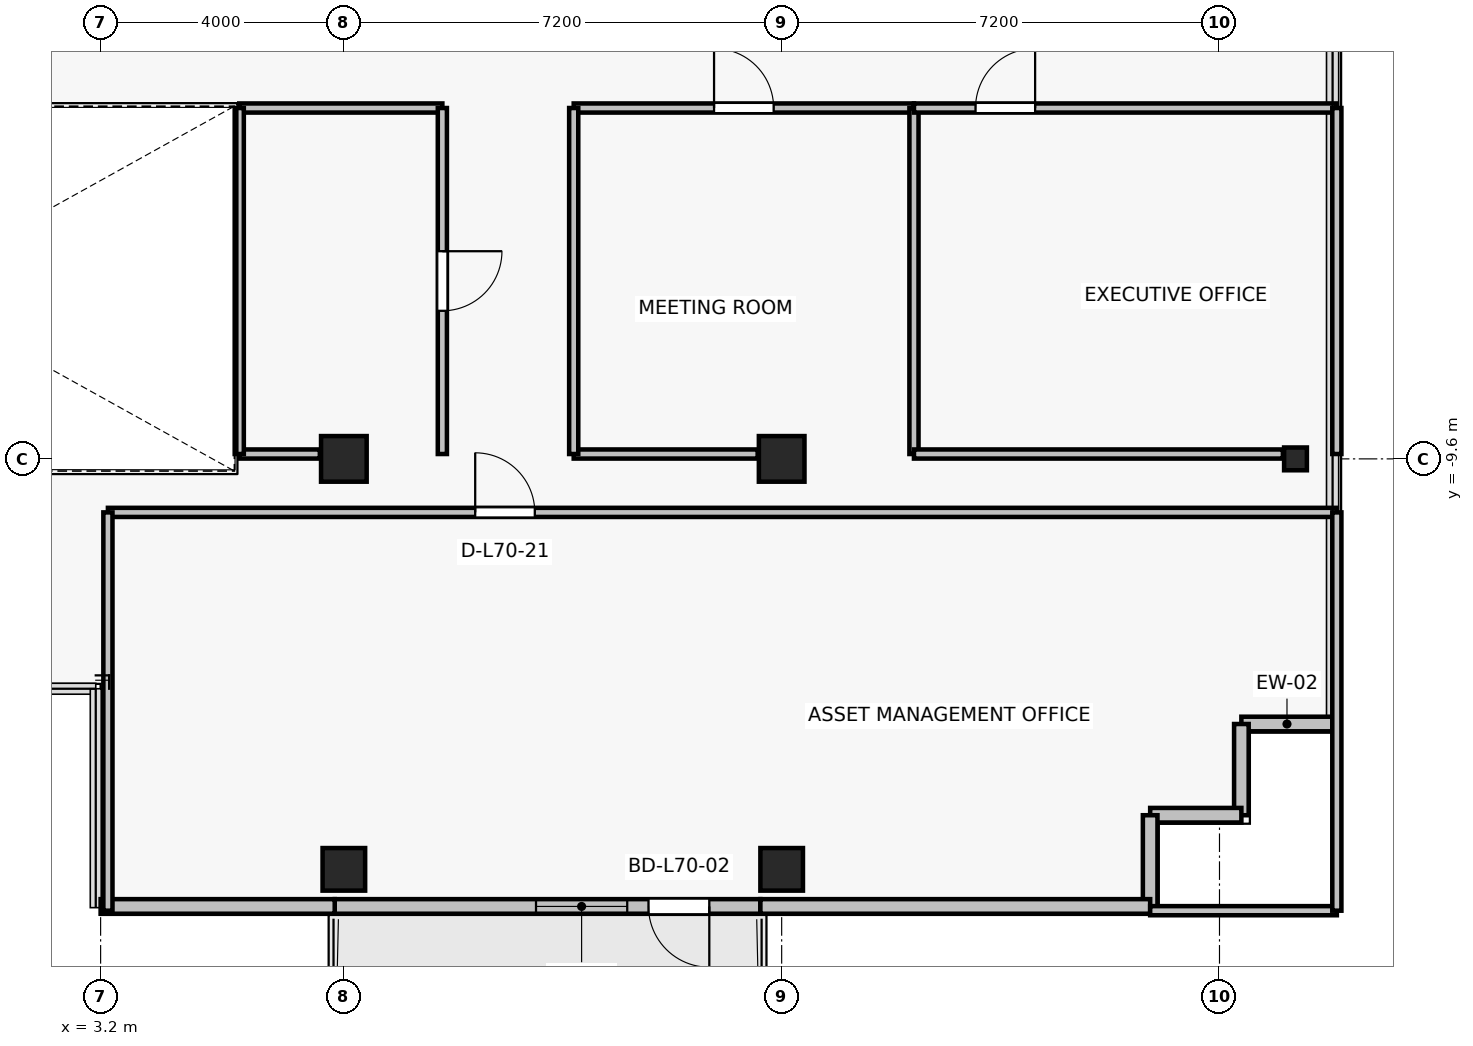
"""IFC4 building model, lengths in metres.
Left out: names, types, materials, properties, quantities, classifications, styles, units other than length and angle.
Written with IfcOpenShell. Run it as: python <this file> out.ifc"""

import sys

from ifc_helpers import new_model, si_unit, direction, frame, frame_2d, origin, origin_2d, place, context, subcontext, project, spatial, rectangle, i_section, extrude, source, transform, mapped, element, fill, save


model = new_model("IFC4")
c1 = context("Model", 3, precision=1e-05, world=origin(), true_north=direction((0.0, 1.0)))
c2 = subcontext(c1, "Body", "Model", "MODEL_VIEW")
j1 = project(units=[si_unit("LENGTHUNIT", "METRE"), si_unit("PLANEANGLEUNIT", "RADIAN")], contexts=[c1])
p1 = place(None, origin())
s1 = spatial("IfcSite", under=j1, at=p1, CompositionType="ELEMENT")
p2 = place(p1, origin())
s2 = spatial("IfcBuilding", under=s1, at=p2, CompositionType="ELEMENT")
p3 = place(p2, frame((0.0, 0.0, 248.5)))
s3 = spatial("IfcBuildingStorey", under=s2, at=p3, CompositionType="ELEMENT", Elevation=248.5)
for number, where, z_axis, x_axis in (
    (1, (7.2, -9.6, 0.0), (0.0, 0.0, 1.0), (1.0, 0.0, 0.0)),
    (2, (14.4, -9.6, 0.0), (0.0, 0.0, 1.0), (1.0, 0.0, 0.0)),
):
    element("IfcColumn", number, at=place(p3, frame(where, z_axis=z_axis, x_axis=x_axis)), inside=s3, PredefinedType="COLUMN", context=c2, shape_type="SweptSolid", body=[
        extrude(rectangle(XDim=0.75, YDim=0.75, at=origin_2d()), origin(), (0.0, 0.0, 1.0), 3.3),
    ])
for number, where, z_axis, x_axis in (
    (3, (7.2, -16.35, 0.0), (0.0, 0.0, 1.0), (1.0, 0.0, 0.0)),
    (4, (14.4, -16.35, 0.0), (0.0, 0.0, 1.0), (1.0, 0.0, 0.0)),
):
    element("IfcColumn", number, at=place(p3, frame(where, z_axis=z_axis, x_axis=x_axis)), inside=s3, PredefinedType="COLUMN", context=c2, shape_type="SweptSolid", body=[
        extrude(rectangle(XDim=0.7, YDim=0.7, at=origin_2d()), origin(), (0.0, 0.0, 1.0), 3.3),
    ])
p4 = place(p3, frame((22.85, -9.6, 0.0), z_axis=(0.0, 0.0, 1.0), x_axis=(1.0, 0.0, 0.0)))
e5 = element("IfcColumn", 5, at=p4, inside=s3, PredefinedType="COLUMN", context=c2, shape_type="SweptSolid", body=[
    extrude(i_section(OverallWidth=0.375, OverallDepth=0.375, WebThickness=0.017, FlangeThickness=0.027, FilletRadius=0.015, at=origin_2d()), origin(), (0.0, 0.0, 1.0), 3.3),
])
p5 = place(p3, frame((14.05, -16.96, 0.0), z_axis=(0.0, 0.0, 1.0), x_axis=(-1.0, 0.0, 0.0)))
e6 = element("IfcWall", 6, at=p5, inside=s3, PredefinedType="SOLIDWALL", context=c2, shape_type="SweptSolid", body=[
    extrude(rectangle(XDim=7.0, YDim=0.24, at=frame_2d((3.5, 0.0))), origin(), (0.0, 0.0, 1.0), 2.665),
])
p6 = place(p5, frame((0.84, 0.0, 0.0)))
e7 = element("IfcOpeningElement", 7, at=p6, cuts=e6, PredefinedType="OPENING", context=c2, shape_type="SweptSolid", body=[
    extrude(rectangle(XDim=1.0, YDim=2.2, at=frame_2d((0.5, 1.1))), frame((0.0, 0.13, 0.0), z_axis=(0.0, -1.0, 0.0), x_axis=(1.0, 0.0, 0.0)), (0.0, 0.0, 1.0), 0.26),
])
p7 = place(p5, frame((2.19, 0.0, 0.85)))
e8 = element("IfcOpeningElement", 8, at=p7, cuts=e6, PredefinedType="OPENING", context=c2, shape_type="SweptSolid", body=[
    extrude(rectangle(XDim=1.5, YDim=1.6, at=frame_2d((0.75, 0.8))), frame((0.0, 0.13, 0.0), z_axis=(0.0, -1.0, 0.0), x_axis=(1.0, 0.0, 0.0)), (0.0, 0.0, 1.0), 0.26),
])
for number, where, z_axis, x_axis in (
    (9, (21.96, -13.96, 0.0), (0.0, 0.0, 1.0), (1.0, 0.0, 0.0)),
    (10, (21.96, -15.46, 0.0), (0.0, 0.0, 1.0), (0.0, 1.0, 0.0)),
    (11, (20.46, -15.46, 0.0), (0.0, 0.0, 1.0), (1.0, 0.0, 0.0)),
    (12, (20.46, -16.96, 0.0), (0.0, 0.0, 1.0), (0.0, 1.0, 0.0)),
):
    element("IfcWall", number, at=place(p3, frame(where, z_axis=z_axis, x_axis=x_axis)), inside=s3, PredefinedType="SOLIDWALL", context=c2, shape_type="SweptSolid", body=[
        extrude(rectangle(XDim=1.5, YDim=0.24, at=frame_2d((0.75, 0.0))), origin(), (0.0, 0.0, 1.0), 3.075),
    ])
p8 = place(p3, frame((14.05, -16.96, 0.0), z_axis=(0.0, 0.0, 1.0), x_axis=(1.0, 0.0, 0.0)))
e13 = element("IfcWall", 13, at=p8, inside=s3, PredefinedType="SOLIDWALL", context=c2, shape_type="SweptSolid", body=[
    extrude(rectangle(XDim=6.41, YDim=0.24, at=frame_2d((3.205, 0.0))), origin(), (0.0, 0.0, 1.0), 3.075),
])
p9 = place(p3, frame((3.2, -16.96, 0.0), z_axis=(0.0, 0.0, 1.0), x_axis=(1.0, 0.0, 0.0)))
e14 = element("IfcWall", 14, at=p9, inside=s3, PredefinedType="SOLIDWALL", context=c2, shape_type="SweptSolid", body=[
    extrude(rectangle(XDim=3.85, YDim=0.24, at=frame_2d((1.925, 0.0))), origin(), (0.0, 0.0, 1.0), 3.075),
])
p10 = place(p3, frame((14.005, -9.52, 0.0), z_axis=(0.0, 0.0, 1.0), x_axis=(-1.0, 0.0, 0.0)))
e15 = element("IfcWall", 15, at=p10, inside=s3, PredefinedType="PARTITIONING", context=c2, shape_type="SweptSolid", body=[
    extrude(rectangle(XDim=3.025, YDim=0.15, at=frame_2d((1.512, 0.0))), origin(), (0.0, 0.0, 1.0), 2.615),
])
p11 = place(p3, frame((10.98, -3.83, 0.0), z_axis=(0.0, 0.0, 1.0), x_axis=(1.0, 0.0, 0.0)))
e16 = element("IfcWall", 16, at=p11, inside=s3, PredefinedType="PARTITIONING", context=c2, shape_type="SweptSolid", body=[
    extrude(rectangle(XDim=5.596, YDim=0.15, at=frame_2d((2.798, 0.0))), origin(), (0.0, 0.0, 1.0), 2.615),
])
p12 = place(p11, frame((2.308, 0.0, 0.0)))
e17 = element("IfcOpeningElement", 17, at=p12, cuts=e16, PredefinedType="OPENING", context=c2, shape_type="SweptSolid", body=[
    extrude(rectangle(XDim=0.98, YDim=2.15, at=frame_2d((0.49, 1.075))), frame((0.0, 0.085, 0.0), z_axis=(0.0, -1.0, 0.0), x_axis=(1.0, 0.0, 0.0)), (0.0, 0.0, 1.0), 0.17),
])
for number, where, z_axis, x_axis in (
    (18, (10.98, -9.52, 0.0), (0.0, 0.0, 1.0), (0.0, 1.0, 0.0)),
    (19, (16.576, -3.83, 0.0), (0.0, 0.0, 1.0), (0.0, -1.0, 0.0)),
):
    element("IfcWall", number, at=place(p3, frame(where, z_axis=z_axis, x_axis=x_axis)), inside=s3, PredefinedType="PARTITIONING", context=c2, shape_type="SweptSolid", body=[
        extrude(rectangle(XDim=5.69, YDim=0.15, at=frame_2d((2.845, 0.0))), origin(), (0.0, 0.0, 1.0), 2.615),
    ])
p13 = place(p3, frame((22.643, -9.52, 0.0), z_axis=(0.0, 0.0, 1.0), x_axis=(-1.0, 0.0, 0.0)))
e20 = element("IfcWall", 20, at=p13, inside=s3, PredefinedType="PARTITIONING", context=c2, shape_type="SweptSolid", body=[
    extrude(rectangle(XDim=6.067, YDim=0.15, at=frame_2d((3.033, 0.0))), origin(), (0.0, 0.0, 1.0), 2.615),
])
p14 = place(p3, frame((16.576, -3.83, 0.0), z_axis=(0.0, 0.0, 1.0), x_axis=(1.0, 0.0, 0.0)))
e21 = element("IfcWall", 21, at=p14, inside=s3, PredefinedType="PARTITIONING", context=c2, shape_type="SweptSolid", body=[
    extrude(rectangle(XDim=6.954, YDim=0.15, at=frame_2d((3.477, 0.0))), origin(), (0.0, 0.0, 1.0), 2.765),
])
p15 = place(p14, frame((1.012, 0.0, 0.0)))
e22 = element("IfcOpeningElement", 22, at=p15, cuts=e21, PredefinedType="OPENING", context=c2, shape_type="SweptSolid", body=[
    extrude(rectangle(XDim=0.98, YDim=2.15, at=frame_2d((0.49, 1.075))), frame((0.0, 0.085, 0.0), z_axis=(0.0, -1.0, 0.0), x_axis=(1.0, 0.0, 0.0)), (0.0, 0.0, 1.0), 0.17),
])
p16 = place(p3, frame((23.53, -3.83, 0.0), z_axis=(0.0, 0.0, 1.0), x_axis=(0.0, -1.0, 0.0)))
e23 = element("IfcWall", 23, at=p16, inside=s3, PredefinedType="PARTITIONING", context=c2, shape_type="SweptSolid", body=[
    extrude(rectangle(XDim=5.69, YDim=0.15, at=frame_2d((2.845, 0.0))), origin(), (0.0, 0.0, 1.0), 2.665),
])
p17 = place(p3, frame((23.53, -17.03, 0.0), z_axis=(0.0, 0.0, 1.0), x_axis=(-1.0, 0.0, 0.0)))
e24 = element("IfcWall", 24, at=p17, inside=s3, PredefinedType="PARTITIONING", context=c2, shape_type="SweptSolid", body=[
    extrude(rectangle(XDim=3.07, YDim=0.15, at=frame_2d((1.535, 0.0))), origin(), (0.0, 0.0, 1.0), 2.665),
])
p18 = place(p3, frame((3.32, -10.48, 0.0), z_axis=(0.0, 0.0, 1.0), x_axis=(1.0, 0.0, 0.0)))
e25 = element("IfcWall", 25, at=p18, inside=s3, PredefinedType="PARTITIONING", context=c2, shape_type="SweptSolid", body=[
    extrude(rectangle(XDim=20.21, YDim=0.15, at=frame_2d((10.105, 0.0))), origin(), (0.0, 0.0, 1.0), 2.615),
])
p19 = place(p18, frame((6.04, 0.0, 0.0)))
e26 = element("IfcOpeningElement", 26, at=p19, cuts=e25, PredefinedType="OPENING", context=c2, shape_type="SweptSolid", body=[
    extrude(rectangle(XDim=0.98, YDim=2.15, at=frame_2d((0.49, 1.075))), frame((0.0, 0.085, 0.0), z_axis=(0.0, -1.0, 0.0), x_axis=(1.0, 0.0, 0.0)), (0.0, 0.0, 1.0), 0.17),
])
p20 = place(p3, frame((3.32, -17.03, 0.0), z_axis=(0.0, 0.0, 1.0), x_axis=(0.0, 1.0, 0.0)))
e27 = element("IfcWall", 27, at=p20, inside=s3, PredefinedType="PARTITIONING", context=c2, shape_type="SweptSolid", body=[
    extrude(rectangle(XDim=6.55, YDim=0.15, at=frame_2d((3.275, 0.0))), origin(), (0.0, 0.0, 1.0), 2.615),
])
p21 = place(p3, frame((23.53, -10.48, 0.0), z_axis=(0.0, 0.0, 1.0), x_axis=(0.0, -1.0, 0.0)))
e28 = element("IfcWall", 28, at=p21, inside=s3, PredefinedType="PARTITIONING", context=c2, shape_type="SweptSolid", body=[
    extrude(rectangle(XDim=6.55, YDim=0.15, at=frame_2d((3.275, 0.0))), origin(), (0.0, 0.0, 1.0), 3.075),
])
p22 = place(p3, frame((6.805, -9.52, 0.0), z_axis=(0.0, 0.0, 1.0), x_axis=(-1.0, 0.0, 0.0)))
e29 = element("IfcWall", 29, at=p22, inside=s3, PredefinedType="PARTITIONING", context=c2, shape_type="SweptSolid", body=[
    extrude(rectangle(XDim=1.325, YDim=0.15, at=frame_2d((0.663, 0.0))), origin(), (0.0, 0.0, 1.0), 2.615),
])
p23 = place(p3, frame((5.48, -3.83, 0.0), z_axis=(0.0, 0.0, 1.0), x_axis=(1.0, 0.0, 0.0)))
e30 = element("IfcWall", 30, at=p23, inside=s3, PredefinedType="PARTITIONING", context=c2, shape_type="SweptSolid", body=[
    extrude(rectangle(XDim=3.34, YDim=0.15, at=frame_2d((1.67, 0.0))), origin(), (0.0, 0.0, 1.0), 2.615),
])
p24 = place(p3, frame((5.48, -9.52, 0.0), z_axis=(0.0, 0.0, 1.0), x_axis=(0.0, 1.0, 0.0)))
e31 = element("IfcWall", 31, at=p24, inside=s3, PredefinedType="PARTITIONING", context=c2, shape_type="SweptSolid", body=[
    extrude(rectangle(XDim=5.69, YDim=0.15, at=frame_2d((2.845, 0.0))), origin(), (0.0, 0.0, 1.0), 2.615),
])
p25 = place(p3, frame((8.82, -3.83, 0.0), z_axis=(0.0, 0.0, 1.0), x_axis=(0.0, -1.0, 0.0)))
e32 = element("IfcWall", 32, at=p25, inside=s3, PredefinedType="PARTITIONING", context=c2, shape_type="SweptSolid", body=[
    extrude(rectangle(XDim=5.69, YDim=0.15, at=frame_2d((2.845, 0.0))), origin(), (0.0, 0.0, 1.0), 2.615),
])
p26 = place(p25, frame((2.355, 0.0, 0.0)))
e33 = element("IfcOpeningElement", 33, at=p26, cuts=e32, PredefinedType="OPENING", context=c2, shape_type="SweptSolid", body=[
    extrude(rectangle(XDim=0.98, YDim=2.15, at=frame_2d((0.49, 1.075))), frame((0.0, 0.085, 0.0), z_axis=(0.0, -1.0, 0.0), x_axis=(1.0, 0.0, 0.0)), (0.0, 0.0, 1.0), 0.17),
])
m1 = source(origin(), c2, "Body", "SweptSolid", [
    extrude(rectangle(XDim=1.0, YDim=2.2, at=frame_2d((0.5, 1.1))), frame((0.0, 0.025, 0.0), z_axis=(0.0, -1.0, 0.0), x_axis=(1.0, 0.0, 0.0)), (0.0, 0.0, 1.0), 0.05),
])
p27 = place(p6, origin())
e34 = element("IfcDoor", 34, at=p27, inside=s3, OperationType="SINGLE_SWING_LEFT", PredefinedType="DOOR", context=c2, shape_type="MappedRepresentation", body=[
    mapped(m1, transform((0.0, 0.0, 0.0), x_axis=(1.0, 0.0, 0.0), y_axis=(0.0, 1.0, 0.0), z_axis=(0.0, 0.0, 1.0), scale=1.0)),
])
fill(e7, e34)
m2 = source(origin(), c2, "Body", "SweptSolid", [
    extrude(rectangle(XDim=1.5, YDim=1.6, at=frame_2d((0.75, 0.8))), frame((0.0, 0.03, 0.0), z_axis=(0.0, -1.0, 0.0), x_axis=(1.0, 0.0, 0.0)), (0.0, 0.0, 1.0), 0.06),
])
p28 = place(p7, origin())
e35 = element("IfcWindow", 35, at=p28, inside=s3, PartitioningType="SINGLE_PANEL", PredefinedType="WINDOW", context=c2, shape_type="MappedRepresentation", body=[
    mapped(m2, transform((0.0, 0.0, 0.0), x_axis=(1.0, 0.0, 0.0), y_axis=(0.0, 1.0, 0.0), z_axis=(0.0, 0.0, 1.0), scale=1.0)),
])
fill(e8, e35)
m3 = source(origin(), c2, "Body", "SweptSolid", [
    extrude(rectangle(XDim=0.98, YDim=2.15, at=frame_2d((0.49, 1.075))), frame((0.0, 0.025, 0.0), z_axis=(0.0, -1.0, 0.0), x_axis=(1.0, 0.0, 0.0)), (0.0, 0.0, 1.0), 0.05),
])
p29 = place(p12, origin())
e36 = element("IfcDoor", 36, at=p29, inside=s3, OperationType="SINGLE_SWING_LEFT", PredefinedType="DOOR", context=c2, shape_type="MappedRepresentation", body=[
    mapped(m3, transform((0.0, 0.0, 0.0), x_axis=(1.0, 0.0, 0.0), y_axis=(0.0, 1.0, 0.0), z_axis=(0.0, 0.0, 1.0), scale=1.0)),
])
fill(e17, e36)
p30 = place(p15, origin())
e37 = element("IfcDoor", 37, at=p30, inside=s3, OperationType="SINGLE_SWING_RIGHT", PredefinedType="DOOR", context=c2, shape_type="MappedRepresentation", body=[
    mapped(m3, transform((0.0, 0.0, 0.0), x_axis=(1.0, 0.0, 0.0), y_axis=(0.0, 1.0, 0.0), z_axis=(0.0, 0.0, 1.0), scale=1.0)),
])
fill(e22, e37)
p31 = place(p19, origin())
e38 = element("IfcDoor", 38, at=p31, inside=s3, OperationType="SINGLE_SWING_LEFT", PredefinedType="DOOR", context=c2, shape_type="MappedRepresentation", body=[
    mapped(m3, transform((0.0, 0.0, 0.0), x_axis=(1.0, 0.0, 0.0), y_axis=(0.0, 1.0, 0.0), z_axis=(0.0, 0.0, 1.0), scale=1.0)),
])
fill(e26, e38)
p32 = place(p26, origin())
e39 = element("IfcDoor", 39, at=p32, inside=s3, OperationType="SINGLE_SWING_LEFT", PredefinedType="DOOR", context=c2, shape_type="MappedRepresentation", body=[
    mapped(m3, transform((0.0, 0.0, 0.0), x_axis=(1.0, 0.0, 0.0), y_axis=(0.0, 1.0, 0.0), z_axis=(0.0, 0.0, 1.0), scale=1.0)),
])
fill(e33, e39)
save(model, sys.argv[1])
